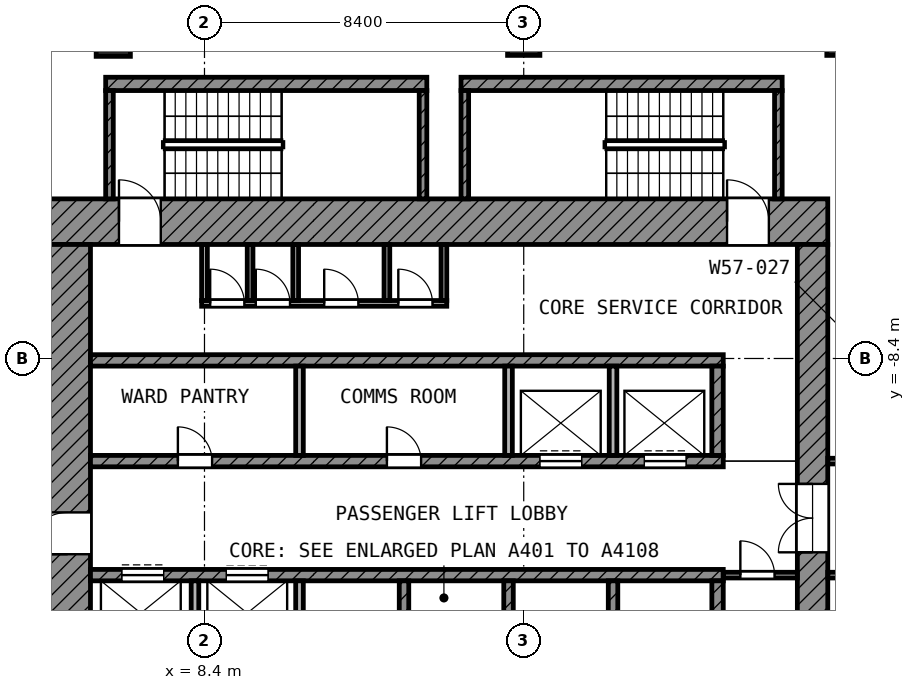
"""IFC4 building model, lengths in metres.
Left out: names, types, materials, properties, quantities, classifications, styles, units other than length and angle.
Written with IfcOpenShell. Run it as: python <this file> out.ifc"""

import sys

from ifc_helpers import new_model, si_unit, direction, frame, frame_2d, origin, origin_2d, place, context, subcontext, project, spatial, rectangle, extrude, element, fill, save


model = new_model("IFC4")
c1 = context("Model", 3, precision=1e-05, world=origin(), true_north=direction((0.0, 1.0)))
c2 = subcontext(c1, "Body", "Model", "MODEL_VIEW")
j1 = project(units=[si_unit("LENGTHUNIT", "METRE"), si_unit("PLANEANGLEUNIT", "RADIAN")], contexts=[c1])
p1 = place(None, origin())
s1 = spatial("IfcSite", under=j1, at=p1, CompositionType="ELEMENT")
p2 = place(p1, origin())
s2 = spatial("IfcBuilding", under=s1, at=p2, CompositionType="ELEMENT")
p3 = place(p2, frame((0.0, 0.0, 268.4)))
s3 = spatial("IfcBuildingStorey", under=s2, at=p3, CompositionType="ELEMENT", Elevation=268.4)
p4 = place(p3, frame((6.0, 0.0, 0.0), z_axis=(0.0, 0.0, 1.0), x_axis=(1.0, 0.0, 0.0)))
e1 = element("IfcColumn", 1, at=p4, inside=s3, PredefinedType="COLUMN", context=c2, shape_type="SweptSolid", body=[
    extrude(rectangle(XDim=0.9, YDim=0.9, at=origin_2d()), origin(), (0.0, 0.0, 1.0), 4.2),
])
for number, where, z_axis, x_axis in (
    (2, (16.8, 0.0, 0.0), (0.0, 0.0, 1.0), (1.0, 0.0, 0.0)),
    (3, (25.2, 0.0, 0.0), (0.0, 0.0, 1.0), (1.0, 0.0, 0.0)),
):
    element("IfcColumn", number, at=place(p3, frame(where, z_axis=z_axis, x_axis=x_axis)), inside=s3, PredefinedType="COLUMN", context=c2, shape_type="SweptSolid", body=[
        extrude(rectangle(XDim=0.85, YDim=0.85, at=origin_2d()), origin(), (0.0, 0.0, 1.0), 4.2),
    ])
p5 = place(p3, frame((4.2, -4.8, 0.0), z_axis=(0.0, 0.0, 1.0), x_axis=(1.0, 0.0, 0.0)))
e4 = element("IfcWall", 4, at=p5, inside=s3, PredefinedType="SHEAR", context=c2, shape_type="SweptSolid", body=[
    extrude(rectangle(XDim=20.6, YDim=1.2, at=frame_2d((10.3, 0.0))), origin(), (0.0, 0.0, 1.0), 3.7),
])
p6 = place(p5, frame((1.95, 0.0, 0.0)))
e5 = element("IfcOpeningElement", 5, at=p6, cuts=e4, PredefinedType="OPENING", context=c2, shape_type="SweptSolid", body=[
    extrude(rectangle(XDim=1.1, YDim=2.1, at=frame_2d((0.55, 1.05))), frame((0.0, 0.61, 0.0), z_axis=(0.0, -1.0, 0.0), x_axis=(1.0, 0.0, 0.0)), (0.0, 0.0, 1.0), 1.22),
])
p7 = place(p5, frame((17.95, 0.0, 0.0)))
e6 = element("IfcOpeningElement", 6, at=p7, cuts=e4, PredefinedType="OPENING", context=c2, shape_type="SweptSolid", body=[
    extrude(rectangle(XDim=1.1, YDim=2.1, at=frame_2d((0.55, 1.05))), frame((0.0, 0.61, 0.0), z_axis=(0.0, -1.0, 0.0), x_axis=(1.0, 0.0, 0.0)), (0.0, 0.0, 1.0), 1.22),
])
p8 = place(p3, frame((4.8, -24.8, 0.0), z_axis=(0.0, 0.0, 1.0), x_axis=(0.0, 1.0, 0.0)))
e7 = element("IfcWall", 7, at=p8, inside=s3, PredefinedType="SHEAR", context=c2, shape_type="SweptSolid", body=[
    extrude(rectangle(XDim=19.4, YDim=1.2, at=frame_2d((9.7, 0.0))), origin(), (0.0, 0.0, 1.0), 3.7),
])
p9 = place(p8, frame((11.25, 0.0, 0.0)))
e8 = element("IfcOpeningElement", 8, at=p9, cuts=e7, PredefinedType="OPENING", context=c2, shape_type="SweptSolid", body=[
    extrude(rectangle(XDim=1.1, YDim=2.1, at=frame_2d((0.55, 1.05))), frame((0.0, 0.61, 0.0), z_axis=(0.0, -1.0, 0.0), x_axis=(1.0, 0.0, 0.0)), (0.0, 0.0, 1.0), 1.22),
])
p10 = place(p8, frame((1.95, 0.0, 0.0)))
e9 = element("IfcOpeningElement", 9, at=p10, cuts=e7, PredefinedType="OPENING", context=c2, shape_type="SweptSolid", body=[
    extrude(rectangle(XDim=1.1, YDim=2.1, at=frame_2d((0.55, 1.05))), frame((0.0, 0.61, 0.0), z_axis=(0.0, -1.0, 0.0), x_axis=(1.0, 0.0, 0.0)), (0.0, 0.0, 1.0), 1.22),
])
p11 = place(p3, frame((24.4, -24.0, 0.0), z_axis=(0.0, 0.0, 1.0), x_axis=(0.0, 1.0, 0.0)))
e10 = element("IfcWall", 10, at=p11, inside=s3, PredefinedType="SHEAR", context=c2, shape_type="SweptSolid", body=[
    extrude(rectangle(XDim=18.6, YDim=0.8, at=frame_2d((9.3, 0.0))), origin(), (0.0, 0.0, 1.0), 3.7),
])
p12 = place(p11, frame((10.5, 0.0, 0.0)))
e11 = element("IfcOpeningElement", 11, at=p12, cuts=e10, PredefinedType="OPENING", context=c2, shape_type="SweptSolid", body=[
    extrude(rectangle(XDim=1.8, YDim=2.1, at=frame_2d((0.9, 1.05))), frame((0.0, 0.41, 0.0), z_axis=(0.0, -1.0, 0.0), x_axis=(1.0, 0.0, 0.0)), (0.0, 0.0, 1.0), 0.82),
])
p13 = place(p3, frame((5.4, -8.45, 0.0), z_axis=(0.0, 0.0, 1.0), x_axis=(1.0, 0.0, 0.0)))
e12 = element("IfcWall", 12, at=p13, inside=s3, PredefinedType="SHEAR", context=c2, shape_type="SweptSolid", body=[
    extrude(rectangle(XDim=16.65, YDim=0.3, at=frame_2d((8.325, 0.0))), origin(), (0.0, 0.0, 1.0), 3.7),
])
p14 = place(p3, frame((5.4, -11.1, 0.0), z_axis=(0.0, 0.0, 1.0), x_axis=(1.0, 0.0, 0.0)))
e13 = element("IfcWall", 13, at=p14, inside=s3, PredefinedType="SHEAR", context=c2, shape_type="SweptSolid", body=[
    extrude(rectangle(XDim=16.65, YDim=0.3, at=frame_2d((8.325, 0.0))), origin(), (0.0, 0.0, 1.0), 3.7),
])
p15 = place(p14, frame((11.825, 0.0, 0.0)))
e14 = element("IfcOpeningElement", 14, at=p15, cuts=e13, PredefinedType="OPENING", context=c2, shape_type="SweptSolid", body=[
    extrude(rectangle(XDim=1.1, YDim=2.1, at=frame_2d((0.55, 1.05))), frame((0.0, 0.16, 0.0), z_axis=(0.0, -1.0, 0.0), x_axis=(1.0, 0.0, 0.0)), (0.0, 0.0, 1.0), 0.32),
])
p16 = place(p14, frame((14.575, 0.0, 0.0)))
e15 = element("IfcOpeningElement", 15, at=p16, cuts=e13, PredefinedType="OPENING", context=c2, shape_type="SweptSolid", body=[
    extrude(rectangle(XDim=1.1, YDim=2.1, at=frame_2d((0.55, 1.05))), frame((0.0, 0.16, 0.0), z_axis=(0.0, -1.0, 0.0), x_axis=(1.0, 0.0, 0.0)), (0.0, 0.0, 1.0), 0.32),
])
p17 = place(p14, frame((2.3, 0.0, 0.0)))
e16 = element("IfcOpeningElement", 16, at=p17, cuts=e13, PredefinedType="OPENING", context=c2, shape_type="SweptSolid", body=[
    extrude(rectangle(XDim=0.9, YDim=2.1, at=frame_2d((0.45, 1.05))), frame((0.0, 0.16, 0.0), z_axis=(0.0, -1.0, 0.0), x_axis=(1.0, 0.0, 0.0)), (0.0, 0.0, 1.0), 0.32),
])
p18 = place(p14, frame((7.8, 0.0, 0.0)))
e17 = element("IfcOpeningElement", 17, at=p18, cuts=e13, PredefinedType="OPENING", context=c2, shape_type="SweptSolid", body=[
    extrude(rectangle(XDim=0.9, YDim=2.1, at=frame_2d((0.45, 1.05))), frame((0.0, 0.16, 0.0), z_axis=(0.0, -1.0, 0.0), x_axis=(1.0, 0.0, 0.0)), (0.0, 0.0, 1.0), 0.32),
])
p19 = place(p3, frame((5.4, -14.1, 0.0), z_axis=(0.0, 0.0, 1.0), x_axis=(1.0, 0.0, 0.0)))
e18 = element("IfcWall", 18, at=p19, inside=s3, PredefinedType="SHEAR", context=c2, shape_type="SweptSolid", body=[
    extrude(rectangle(XDim=16.65, YDim=0.3, at=frame_2d((8.325, 0.0))), origin(), (0.0, 0.0, 1.0), 3.7),
])
p20 = place(p19, frame((0.825, 0.0, 0.0)))
e19 = element("IfcOpeningElement", 19, at=p20, cuts=e18, PredefinedType="OPENING", context=c2, shape_type="SweptSolid", body=[
    extrude(rectangle(XDim=1.1, YDim=2.1, at=frame_2d((0.55, 1.05))), frame((0.0, 0.16, 0.0), z_axis=(0.0, -1.0, 0.0), x_axis=(1.0, 0.0, 0.0)), (0.0, 0.0, 1.0), 0.32),
])
p21 = place(p19, frame((3.575, 0.0, 0.0)))
e20 = element("IfcOpeningElement", 20, at=p21, cuts=e18, PredefinedType="OPENING", context=c2, shape_type="SweptSolid", body=[
    extrude(rectangle(XDim=1.1, YDim=2.1, at=frame_2d((0.55, 1.05))), frame((0.0, 0.16, 0.0), z_axis=(0.0, -1.0, 0.0), x_axis=(1.0, 0.0, 0.0)), (0.0, 0.0, 1.0), 0.32),
])
p22 = place(p3, frame((21.9, -10.95, 0.0), z_axis=(0.0, 0.0, 1.0), x_axis=(0.0, 1.0, 0.0)))
e21 = element("IfcWall", 21, at=p22, inside=s3, PredefinedType="SHEAR", context=c2, shape_type="SweptSolid", body=[
    extrude(rectangle(XDim=2.35, YDim=0.3, at=frame_2d((1.175, 0.0))), origin(), (0.0, 0.0, 1.0), 3.7),
])
p23 = place(p3, frame((21.9, -16.6, 0.0), z_axis=(0.0, 0.0, 1.0), x_axis=(0.0, 1.0, 0.0)))
e22 = element("IfcWall", 22, at=p23, inside=s3, PredefinedType="SHEAR", context=c2, shape_type="SweptSolid", body=[
    extrude(rectangle(XDim=2.35, YDim=0.3, at=frame_2d((1.175, 0.0))), origin(), (0.0, 0.0, 1.0), 3.7),
])
for number, where, z_axis, x_axis in (
    (23, (10.9, -10.95, 0.0), (0.0, 0.0, 1.0), (0.0, 1.0, 0.0)),
    (24, (16.4, -10.95, 0.0), (0.0, 0.0, 1.0), (0.0, 1.0, 0.0)),
    (25, (19.15, -10.95, 0.0), (0.0, 0.0, 1.0), (0.0, 1.0, 0.0)),
):
    element("IfcWall", number, at=place(p3, frame(where, z_axis=z_axis, x_axis=x_axis)), inside=s3, PredefinedType="PARTITIONING", context=c2, shape_type="SweptSolid", body=[
        extrude(rectangle(XDim=2.35, YDim=0.2, at=frame_2d((1.175, 0.0))), origin(), (0.0, 0.0, 1.0), 3.7),
    ])
for number, where, z_axis, x_axis in (
    (26, (8.15, -16.6, 0.0), (0.0, 0.0, 1.0), (0.0, 1.0, 0.0)),
    (27, (10.9, -16.6, 0.0), (0.0, 0.0, 1.0), (0.0, 1.0, 0.0)),
):
    element("IfcWall", number, at=place(p3, frame(where, z_axis=z_axis, x_axis=x_axis)), inside=s3, PredefinedType="PARTITIONING", context=c2, shape_type="SweptSolid", body=[
        extrude(rectangle(XDim=2.35, YDim=0.2, at=frame_2d((1.175, 0.0))), origin(), (0.0, 0.0, 1.0), 3.7),
    ])
for number, where, z_axis, x_axis in (
    (28, (13.65, -16.6, 0.0), (0.0, 0.0, 1.0), (0.0, 1.0, 0.0)),
    (29, (16.4, -16.6, 0.0), (0.0, 0.0, 1.0), (0.0, 1.0, 0.0)),
    (30, (19.15, -16.6, 0.0), (0.0, 0.0, 1.0), (0.0, 1.0, 0.0)),
):
    element("IfcWall", number, at=place(p3, frame(where, z_axis=z_axis, x_axis=x_axis)), inside=s3, PredefinedType="SHEAR", context=c2, shape_type="SweptSolid", body=[
        extrude(rectangle(XDim=2.35, YDim=0.25, at=frame_2d((1.175, 0.0))), origin(), (0.0, 0.0, 1.0), 3.7),
    ])
p24 = place(p3, frame((22.05, -14.1, 0.0), z_axis=(0.0, 0.0, 1.0), x_axis=(1.0, 0.0, 0.0)))
e31 = element("IfcWall", 31, at=p24, inside=s3, PredefinedType="PARTITIONING", context=c2, shape_type="SweptSolid", body=[
    extrude(rectangle(XDim=1.95, YDim=0.15, at=frame_2d((0.975, 0.0))), origin(), (0.0, 0.0, 1.0), 3.7),
])
p25 = place(p24, frame((0.45, 0.0, 0.0)))
e32 = element("IfcOpeningElement", 32, at=p25, cuts=e31, PredefinedType="OPENING", context=c2, shape_type="SweptSolid", body=[
    extrude(rectangle(XDim=0.9, YDim=2.1, at=frame_2d((0.45, 1.05))), frame((0.0, 0.085, 0.0), z_axis=(0.0, -1.0, 0.0), x_axis=(1.0, 0.0, 0.0)), (0.0, 0.0, 1.0), 0.17),
])
p26 = place(p3, frame((8.325, -6.95, 0.0), z_axis=(0.0, 0.0, 1.0), x_axis=(1.0, 0.0, 0.0)))
e33 = element("IfcWall", 33, at=p26, inside=s3, PredefinedType="PARTITIONING", context=c2, shape_type="SweptSolid", body=[
    extrude(rectangle(XDim=6.45, YDim=0.15, at=frame_2d((3.225, 0.0))), origin(), (0.0, 0.0, 1.0), 3.7),
])
p27 = place(p26, frame((0.225, 0.0, 0.0)))
e34 = element("IfcOpeningElement", 34, at=p27, cuts=e33, PredefinedType="OPENING", context=c2, shape_type="SweptSolid", body=[
    extrude(rectangle(XDim=0.9, YDim=2.1, at=frame_2d((0.45, 1.05))), frame((0.0, 0.085, 0.0), z_axis=(0.0, -1.0, 0.0), x_axis=(1.0, 0.0, 0.0)), (0.0, 0.0, 1.0), 0.17),
])
p28 = place(p26, frame((1.425, 0.0, 0.0)))
e35 = element("IfcOpeningElement", 35, at=p28, cuts=e33, PredefinedType="OPENING", context=c2, shape_type="SweptSolid", body=[
    extrude(rectangle(XDim=0.9, YDim=2.1, at=frame_2d((0.45, 1.05))), frame((0.0, 0.085, 0.0), z_axis=(0.0, -1.0, 0.0), x_axis=(1.0, 0.0, 0.0)), (0.0, 0.0, 1.0), 0.17),
])
p29 = place(p26, frame((3.225, 0.0, 0.0)))
e36 = element("IfcOpeningElement", 36, at=p29, cuts=e33, PredefinedType="OPENING", context=c2, shape_type="SweptSolid", body=[
    extrude(rectangle(XDim=0.9, YDim=2.1, at=frame_2d((0.45, 1.05))), frame((0.0, 0.085, 0.0), z_axis=(0.0, -1.0, 0.0), x_axis=(1.0, 0.0, 0.0)), (0.0, 0.0, 1.0), 0.17),
])
p30 = place(p26, frame((5.175, 0.0, 0.0)))
e37 = element("IfcOpeningElement", 37, at=p30, cuts=e33, PredefinedType="OPENING", context=c2, shape_type="SweptSolid", body=[
    extrude(rectangle(XDim=0.9, YDim=2.1, at=frame_2d((0.45, 1.05))), frame((0.0, 0.085, 0.0), z_axis=(0.0, -1.0, 0.0), x_axis=(1.0, 0.0, 0.0)), (0.0, 0.0, 1.0), 0.17),
])
for number, where, z_axis, x_axis in (
    (38, (8.4, -6.875, 0.0), (0.0, 0.0, 1.0), (0.0, 1.0, 0.0)),
    (39, (9.6, -6.875, 0.0), (0.0, 0.0, 1.0), (0.0, 1.0, 0.0)),
    (40, (10.8, -6.875, 0.0), (0.0, 0.0, 1.0), (0.0, 1.0, 0.0)),
    (41, (13.2, -6.875, 0.0), (0.0, 0.0, 1.0), (0.0, 1.0, 0.0)),
    (42, (14.7, -6.875, 0.0), (0.0, 0.0, 1.0), (0.0, 1.0, 0.0)),
):
    element("IfcWall", number, at=place(p3, frame(where, z_axis=z_axis, x_axis=x_axis)), inside=s3, PredefinedType="PARTITIONING", context=c2, shape_type="SweptSolid", body=[
        extrude(rectangle(XDim=1.475, YDim=0.15, at=frame_2d((0.738, 0.0))), origin(), (0.0, 0.0, 1.0), 3.7),
    ])
p31 = place(p3, frame((5.8, -1.175, 0.0), z_axis=(0.0, 0.0, 1.0), x_axis=(1.0, 0.0, 0.0)))
e43 = element("IfcWall", 43, at=p31, inside=s3, PredefinedType="SHEAR", context=c2, shape_type="SweptSolid", body=[
    extrude(rectangle(XDim=8.45, YDim=0.35, at=frame_2d((4.225, 0.0))), origin(), (0.0, 0.0, 1.0), 3.7),
])
for number, where, z_axis, x_axis in (
    (44, (5.9, -4.2, 0.0), (0.0, 0.0, 1.0), (0.0, 1.0, 0.0)),
    (45, (14.15, -4.2, 0.0), (0.0, 0.0, 1.0), (0.0, 1.0, 0.0)),
):
    element("IfcWall", number, at=place(p3, frame(where, z_axis=z_axis, x_axis=x_axis)), inside=s3, PredefinedType="SHEAR", context=c2, shape_type="SweptSolid", body=[
        extrude(rectangle(XDim=2.85, YDim=0.2, at=frame_2d((1.425, 0.0))), origin(), (0.0, 0.0, 1.0), 3.7),
    ])
p32 = place(p3, frame((15.15, -1.175, 0.0), z_axis=(0.0, 0.0, 1.0), x_axis=(1.0, 0.0, 0.0)))
e46 = element("IfcWall", 46, at=p32, inside=s3, PredefinedType="SHEAR", context=c2, shape_type="SweptSolid", body=[
    extrude(rectangle(XDim=8.45, YDim=0.35, at=frame_2d((4.225, 0.0))), origin(), (0.0, 0.0, 1.0), 3.7),
])
for number, where, z_axis, x_axis in (
    (47, (15.25, -4.2, 0.0), (0.0, 0.0, 1.0), (0.0, 1.0, 0.0)),
    (48, (23.5, -4.2, 0.0), (0.0, 0.0, 1.0), (0.0, 1.0, 0.0)),
):
    element("IfcWall", number, at=place(p3, frame(where, z_axis=z_axis, x_axis=x_axis)), inside=s3, PredefinedType="SHEAR", context=c2, shape_type="SweptSolid", body=[
        extrude(rectangle(XDim=2.85, YDim=0.2, at=frame_2d((1.425, 0.0))), origin(), (0.0, 0.0, 1.0), 3.7),
    ])
p33 = place(p3, frame((24.8, -14.1, 0.0), z_axis=(0.0, 0.0, 1.0), x_axis=(1.0, 0.0, 0.0)))
e49 = element("IfcWall", 49, at=p33, inside=s3, PredefinedType="PARTITIONING", context=c2, shape_type="SweptSolid", body=[
    extrude(rectangle(XDim=4.525, YDim=0.15, at=frame_2d((2.262, 0.0))), origin(), (0.0, 0.0, 1.0), 3.7),
])
p34 = place(p33, frame((1.75, 0.0, 0.0)))
e50 = element("IfcOpeningElement", 50, at=p34, cuts=e49, PredefinedType="OPENING", context=c2, shape_type="SweptSolid", body=[
    extrude(rectangle(XDim=1.5, YDim=2.1, at=frame_2d((0.75, 1.05))), frame((0.0, 0.085, 0.0), z_axis=(0.0, -1.0, 0.0), x_axis=(1.0, 0.0, 0.0)), (0.0, 0.0, 1.0), 0.17),
])
p35 = place(p3, frame((24.8, -11.1, 0.0), z_axis=(0.0, 0.0, 1.0), x_axis=(1.0, 0.0, 0.0)))
e51 = element("IfcWall", 51, at=p35, inside=s3, PredefinedType="PARTITIONING", context=c2, shape_type="SweptSolid", body=[
    extrude(rectangle(XDim=4.6, YDim=0.15, at=frame_2d((2.3, 0.0))), origin(), (0.0, 0.0, 1.0), 3.7),
])
p36 = place(p35, frame((1.9, 0.0, 0.0)))
e52 = element("IfcOpeningElement", 52, at=p36, cuts=e51, PredefinedType="OPENING", context=c2, shape_type="SweptSolid", body=[
    extrude(rectangle(XDim=1.2, YDim=2.1, at=frame_2d((0.6, 1.05))), frame((0.0, 0.085, 0.0), z_axis=(0.0, -1.0, 0.0), x_axis=(1.0, 0.0, 0.0)), (0.0, 0.0, 1.0), 0.17),
])
p37 = place(p15, origin())
e53 = element("IfcDoor", 53, at=p37, inside=s3, OperationType="DOUBLE_DOOR_SLIDING", PredefinedType="DOOR", context=c2, shape_type="SweptSolid", body=[
    extrude(rectangle(XDim=1.1, YDim=2.1, at=frame_2d((0.55, 1.05))), frame((0.0, 0.025, 0.0), z_axis=(0.0, -1.0, 0.0), x_axis=(1.0, 0.0, 0.0)), (0.0, 0.0, 1.0), 0.05),
])
fill(e14, e53)
p38 = place(p16, origin())
e54 = element("IfcDoor", 54, at=p38, inside=s3, OperationType="DOUBLE_DOOR_SLIDING", PredefinedType="DOOR", context=c2, shape_type="SweptSolid", body=[
    extrude(rectangle(XDim=1.1, YDim=2.1, at=frame_2d((0.55, 1.05))), frame((0.0, 0.025, 0.0), z_axis=(0.0, -1.0, 0.0), x_axis=(1.0, 0.0, 0.0)), (0.0, 0.0, 1.0), 0.05),
])
fill(e15, e54)
p39 = place(p20, origin())
e55 = element("IfcDoor", 55, at=p39, inside=s3, OperationType="DOUBLE_DOOR_SLIDING", PredefinedType="DOOR", context=c2, shape_type="SweptSolid", body=[
    extrude(rectangle(XDim=1.1, YDim=2.1, at=frame_2d((0.55, 1.05))), frame((0.0, 0.025, 0.0), z_axis=(0.0, -1.0, 0.0), x_axis=(1.0, 0.0, 0.0)), (0.0, 0.0, 1.0), 0.05),
])
fill(e19, e55)
p40 = place(p21, origin())
e56 = element("IfcDoor", 56, at=p40, inside=s3, OperationType="DOUBLE_DOOR_SLIDING", PredefinedType="DOOR", context=c2, shape_type="SweptSolid", body=[
    extrude(rectangle(XDim=1.1, YDim=2.1, at=frame_2d((0.55, 1.05))), frame((0.0, 0.025, 0.0), z_axis=(0.0, -1.0, 0.0), x_axis=(1.0, 0.0, 0.0)), (0.0, 0.0, 1.0), 0.05),
])
fill(e20, e56)
p41 = place(p9, origin())
e57 = element("IfcDoor", 57, at=p41, inside=s3, OperationType="SINGLE_SWING_LEFT", PredefinedType="DOOR", context=c2, shape_type="SweptSolid", body=[
    extrude(rectangle(XDim=1.1, YDim=2.1, at=frame_2d((0.55, 1.05))), frame((0.0, 0.025, 0.0), z_axis=(0.0, -1.0, 0.0), x_axis=(1.0, 0.0, 0.0)), (0.0, 0.0, 1.0), 0.05),
])
fill(e8, e57)
p42 = place(p6, origin())
e58 = element("IfcDoor", 58, at=p42, inside=s3, OperationType="SINGLE_SWING_LEFT", PredefinedType="DOOR", context=c2, shape_type="SweptSolid", body=[
    extrude(rectangle(XDim=1.1, YDim=2.1, at=frame_2d((0.55, 1.05))), frame((0.0, 0.025, 0.0), z_axis=(0.0, -1.0, 0.0), x_axis=(1.0, 0.0, 0.0)), (0.0, 0.0, 1.0), 0.05),
])
fill(e5, e58)
p43 = place(p7, origin())
e59 = element("IfcDoor", 59, at=p43, inside=s3, OperationType="SINGLE_SWING_LEFT", PredefinedType="DOOR", context=c2, shape_type="SweptSolid", body=[
    extrude(rectangle(XDim=1.1, YDim=2.1, at=frame_2d((0.55, 1.05))), frame((0.0, 0.025, 0.0), z_axis=(0.0, -1.0, 0.0), x_axis=(1.0, 0.0, 0.0)), (0.0, 0.0, 1.0), 0.05),
])
fill(e6, e59)
p44 = place(p12, origin())
e60 = element("IfcDoor", 60, at=p44, inside=s3, OperationType="DOUBLE_DOOR_SINGLE_SWING", PredefinedType="DOOR", context=c2, shape_type="SweptSolid", body=[
    extrude(rectangle(XDim=1.8, YDim=2.1, at=frame_2d((0.9, 1.05))), frame((0.0, 0.025, 0.0), z_axis=(0.0, -1.0, 0.0), x_axis=(1.0, 0.0, 0.0)), (0.0, 0.0, 1.0), 0.05),
])
fill(e11, e60)
p45 = place(p27, origin())
e61 = element("IfcDoor", 61, at=p45, inside=s3, OperationType="SINGLE_SWING_LEFT", PredefinedType="DOOR", context=c2, shape_type="SweptSolid", body=[
    extrude(rectangle(XDim=0.9, YDim=2.1, at=frame_2d((0.45, 1.05))), frame((0.0, 0.025, 0.0), z_axis=(0.0, -1.0, 0.0), x_axis=(1.0, 0.0, 0.0)), (0.0, 0.0, 1.0), 0.05),
])
fill(e34, e61)
p46 = place(p28, origin())
e62 = element("IfcDoor", 62, at=p46, inside=s3, OperationType="SINGLE_SWING_LEFT", PredefinedType="DOOR", context=c2, shape_type="SweptSolid", body=[
    extrude(rectangle(XDim=0.9, YDim=2.1, at=frame_2d((0.45, 1.05))), frame((0.0, 0.025, 0.0), z_axis=(0.0, -1.0, 0.0), x_axis=(1.0, 0.0, 0.0)), (0.0, 0.0, 1.0), 0.05),
])
fill(e35, e62)
p47 = place(p29, origin())
e63 = element("IfcDoor", 63, at=p47, inside=s3, OperationType="SINGLE_SWING_LEFT", PredefinedType="DOOR", context=c2, shape_type="SweptSolid", body=[
    extrude(rectangle(XDim=0.9, YDim=2.1, at=frame_2d((0.45, 1.05))), frame((0.0, 0.025, 0.0), z_axis=(0.0, -1.0, 0.0), x_axis=(1.0, 0.0, 0.0)), (0.0, 0.0, 1.0), 0.05),
])
fill(e36, e63)
p48 = place(p30, origin())
e64 = element("IfcDoor", 64, at=p48, inside=s3, OperationType="SINGLE_SWING_LEFT", PredefinedType="DOOR", context=c2, shape_type="SweptSolid", body=[
    extrude(rectangle(XDim=0.9, YDim=2.1, at=frame_2d((0.45, 1.05))), frame((0.0, 0.025, 0.0), z_axis=(0.0, -1.0, 0.0), x_axis=(1.0, 0.0, 0.0)), (0.0, 0.0, 1.0), 0.05),
])
fill(e37, e64)
p49 = place(p25, origin())
e65 = element("IfcDoor", 65, at=p49, inside=s3, OperationType="SINGLE_SWING_LEFT", PredefinedType="DOOR", context=c2, shape_type="SweptSolid", body=[
    extrude(rectangle(XDim=0.9, YDim=2.1, at=frame_2d((0.45, 1.05))), frame((0.0, 0.025, 0.0), z_axis=(0.0, -1.0, 0.0), x_axis=(1.0, 0.0, 0.0)), (0.0, 0.0, 1.0), 0.05),
])
fill(e32, e65)
p50 = place(p17, origin())
e66 = element("IfcDoor", 66, at=p50, inside=s3, OperationType="SINGLE_SWING_LEFT", PredefinedType="DOOR", context=c2, shape_type="SweptSolid", body=[
    extrude(rectangle(XDim=0.9, YDim=2.1, at=frame_2d((0.45, 1.05))), frame((0.0, 0.025, 0.0), z_axis=(0.0, -1.0, 0.0), x_axis=(1.0, 0.0, 0.0)), (0.0, 0.0, 1.0), 0.05),
])
fill(e16, e66)
p51 = place(p18, origin())
e67 = element("IfcDoor", 67, at=p51, inside=s3, OperationType="SINGLE_SWING_LEFT", PredefinedType="DOOR", context=c2, shape_type="SweptSolid", body=[
    extrude(rectangle(XDim=0.9, YDim=2.1, at=frame_2d((0.45, 1.05))), frame((0.0, 0.025, 0.0), z_axis=(0.0, -1.0, 0.0), x_axis=(1.0, 0.0, 0.0)), (0.0, 0.0, 1.0), 0.05),
])
fill(e17, e67)
save(model, sys.argv[1])
